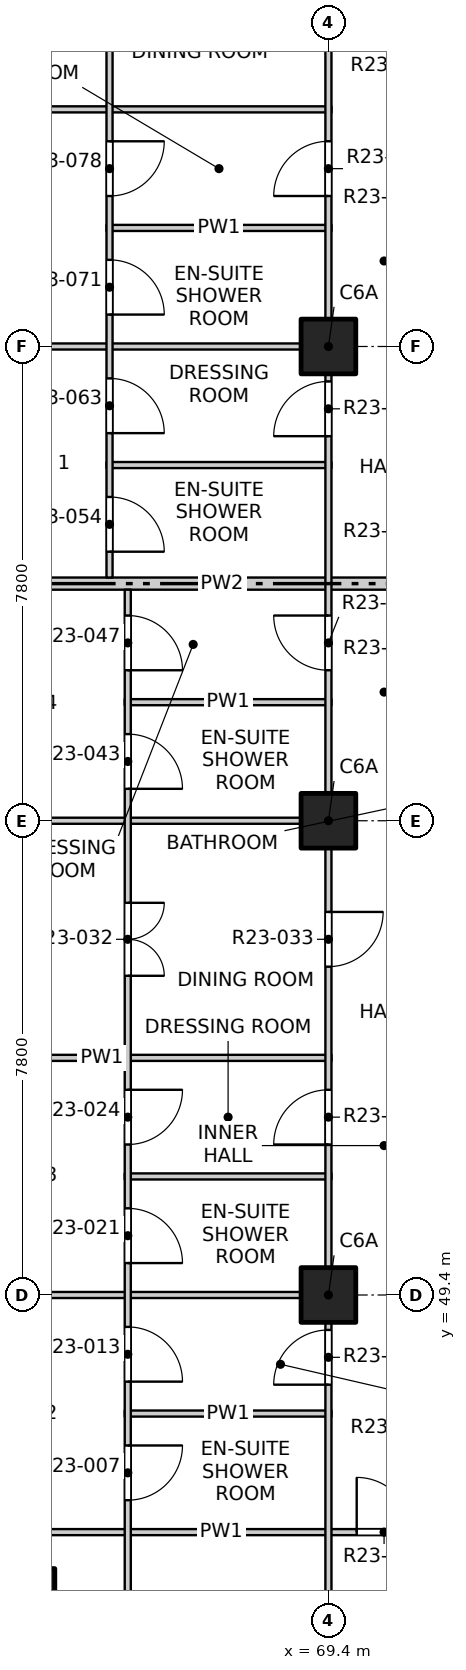
"""IFC4 building model, lengths in metres.
Left out: names, types, materials, properties, quantities, classifications, styles, units other than length and angle.
Written with IfcOpenShell. Run it as: python <this file> out.ifc"""

import sys

from ifc_helpers import new_model, si_unit, direction, frame, frame_2d, origin, origin_2d, place, context, subcontext, project, spatial, rectangle, extrude, element, fill, save


model = new_model("IFC4")
c1 = context("Model", 3, precision=1e-05, world=origin(), true_north=direction((0.0, 1.0)))
c2 = subcontext(c1, "Body", "Model", "MODEL_VIEW")
j1 = project(units=[si_unit("LENGTHUNIT", "METRE"), si_unit("PLANEANGLEUNIT", "RADIAN")], contexts=[c1])
p1 = place(None, origin())
s1 = spatial("IfcSite", under=j1, at=p1, CompositionType="ELEMENT")
p2 = place(p1, origin())
s2 = spatial("IfcBuilding", under=s1, at=p2, CompositionType="ELEMENT")
p3 = place(p2, frame((0.0, 0.0, 238.1)))
s3 = spatial("IfcBuildingStorey", under=s2, at=p3, CompositionType="ELEMENT", Elevation=238.1)
p4 = place(p3, frame((64.5, 44.5, -0.25), z_axis=(0.0, 0.0, 1.0), x_axis=(1.0, 0.0, 0.0)))
e1 = element("IfcColumn", 1, at=p4, inside=s3, PredefinedType="COLUMN", context=c2, shape_type="SweptSolid", body=[
    extrude(rectangle(XDim=0.8, YDim=0.8, at=origin_2d()), origin(), (0.0, 0.0, 1.0), 3.35),
])
for number, where, z_axis, x_axis in (
    (2, (69.4, 49.4, -0.25), (0.0, 0.0, 1.0), (1.0, 0.0, 0.0)),
    (3, (69.4, 57.2, -0.25), (0.0, 0.0, 1.0), (1.0, 0.0, 0.0)),
    (4, (69.4, 65.0, -0.25), (0.0, 0.0, 1.0), (1.0, 0.0, 0.0)),
):
    element("IfcColumn", number, at=place(p3, frame(where, z_axis=z_axis, x_axis=x_axis)), inside=s3, PredefinedType="COLUMN", context=c2, shape_type="SweptSolid", body=[
        extrude(rectangle(XDim=0.9, YDim=0.9, at=origin_2d()), origin(), (0.0, 0.0, 1.0), 3.35),
    ])
p5 = place(p3, frame((61.9, 45.5, 0.0), z_axis=(0.0, 0.0, 1.0), x_axis=(1.0, 0.0, 0.0)))
e5 = element("IfcWall", 5, at=p5, inside=s3, PredefinedType="PARTITIONING", context=c2, shape_type="SweptSolid", body=[
    extrude(rectangle(XDim=11.475, YDim=0.1, at=frame_2d((5.737, 0.0))), origin(), (0.0, 0.0, 1.0), 3.1),
])
p6 = place(p5, frame((7.965, 0.0, 0.0)))
e6 = element("IfcOpeningElement", 6, at=p6, cuts=e5, PredefinedType="OPENING", context=c2, shape_type="SweptSolid", body=[
    extrude(rectangle(XDim=0.9, YDim=2.1, at=frame_2d((0.45, 1.05))), frame((0.0, 0.06, 0.0), z_axis=(0.0, -1.0, 0.0), x_axis=(1.0, 0.0, 0.0)), (0.0, 0.0, 1.0), 0.12),
])
p7 = place(p3, frame((66.05, 47.45, 0.0), z_axis=(0.0, 0.0, 1.0), x_axis=(1.0, 0.0, 0.0)))
e7 = element("IfcWall", 7, at=p7, inside=s3, PredefinedType="PARTITIONING", context=c2, shape_type="SweptSolid", body=[
    extrude(rectangle(XDim=3.4, YDim=0.1, at=frame_2d((1.7, 0.0))), origin(), (0.0, 0.0, 1.0), 3.1),
])
p8 = place(p3, frame((61.9, 49.4, 0.0), z_axis=(0.0, 0.0, 1.0), x_axis=(1.0, 0.0, 0.0)))
e8 = element("IfcWall", 8, at=p8, inside=s3, PredefinedType="PARTITIONING", context=c2, shape_type="SweptSolid", body=[
    extrude(rectangle(XDim=7.55, YDim=0.1, at=frame_2d((3.775, 0.0))), origin(), (0.0, 0.0, 1.0), 3.1),
])
p9 = place(p3, frame((66.05, 51.35, 0.0), z_axis=(0.0, 0.0, 1.0), x_axis=(1.0, 0.0, 0.0)))
e9 = element("IfcWall", 9, at=p9, inside=s3, PredefinedType="PARTITIONING", context=c2, shape_type="SweptSolid", body=[
    extrude(rectangle(XDim=3.4, YDim=0.1, at=frame_2d((1.7, 0.0))), origin(), (0.0, 0.0, 1.0), 3.1),
])
for number, where, z_axis, x_axis in (
    (10, (61.9, 53.3, 0.0), (0.0, 0.0, 1.0), (1.0, 0.0, 0.0)),
    (11, (61.9, 57.2, 0.0), (0.0, 0.0, 1.0), (1.0, 0.0, 0.0)),
):
    element("IfcWall", number, at=place(p3, frame(where, z_axis=z_axis, x_axis=x_axis)), inside=s3, PredefinedType="PARTITIONING", context=c2, shape_type="SweptSolid", body=[
        extrude(rectangle(XDim=7.55, YDim=0.1, at=frame_2d((3.775, 0.0))), origin(), (0.0, 0.0, 1.0), 3.1),
    ])
p10 = place(p3, frame((66.05, 59.15, 0.0), z_axis=(0.0, 0.0, 1.0), x_axis=(1.0, 0.0, 0.0)))
e12 = element("IfcWall", 12, at=p10, inside=s3, PredefinedType="PARTITIONING", context=c2, shape_type="SweptSolid", body=[
    extrude(rectangle(XDim=3.4, YDim=0.1, at=frame_2d((1.7, 0.0))), origin(), (0.0, 0.0, 1.0), 3.1),
])
p11 = place(p3, frame((61.9, 61.1, 0.0), z_axis=(0.0, 0.0, 1.0), x_axis=(1.0, 0.0, 0.0)))
e13 = element("IfcWall", 13, at=p11, inside=s3, PredefinedType="PARTITIONING", context=c2, shape_type="SweptSolid", body=[
    extrude(rectangle(XDim=11.5, YDim=0.2, at=frame_2d((5.75, 0.0))), origin(), (0.0, 0.0, 1.0), 3.1),
])
p12 = place(p3, frame((65.75, 63.05, 0.0), z_axis=(0.0, 0.0, 1.0), x_axis=(1.0, 0.0, 0.0)))
e14 = element("IfcWall", 14, at=p12, inside=s3, PredefinedType="PARTITIONING", context=c2, shape_type="SweptSolid", body=[
    extrude(rectangle(XDim=3.7, YDim=0.1, at=frame_2d((1.85, 0.0))), origin(), (0.0, 0.0, 1.0), 3.1),
])
p13 = place(p3, frame((61.9, 65.0, 0.0), z_axis=(0.0, 0.0, 1.0), x_axis=(1.0, 0.0, 0.0)))
e15 = element("IfcWall", 15, at=p13, inside=s3, PredefinedType="PARTITIONING", context=c2, shape_type="SweptSolid", body=[
    extrude(rectangle(XDim=7.55, YDim=0.1, at=frame_2d((3.775, 0.0))), origin(), (0.0, 0.0, 1.0), 3.1),
])
p14 = place(p3, frame((65.75, 66.95, 0.0), z_axis=(0.0, 0.0, 1.0), x_axis=(1.0, 0.0, 0.0)))
e16 = element("IfcWall", 16, at=p14, inside=s3, PredefinedType="PARTITIONING", context=c2, shape_type="SweptSolid", body=[
    extrude(rectangle(XDim=3.7, YDim=0.1, at=frame_2d((1.85, 0.0))), origin(), (0.0, 0.0, 1.0), 3.1),
])
p15 = place(p3, frame((61.9, 68.9, 0.0), z_axis=(0.0, 0.0, 1.0), x_axis=(1.0, 0.0, 0.0)))
e17 = element("IfcWall", 17, at=p15, inside=s3, PredefinedType="PARTITIONING", context=c2, shape_type="SweptSolid", body=[
    extrude(rectangle(XDim=7.55, YDim=0.1, at=frame_2d((3.775, 0.0))), origin(), (0.0, 0.0, 1.0), 3.1),
])
p16 = place(p3, frame((65.8, 61.2, 0.0), z_axis=(0.0, 0.0, 1.0), x_axis=(0.0, 1.0, 0.0)))
e18 = element("IfcWall", 18, at=p16, inside=s3, PredefinedType="PARTITIONING", context=c2, shape_type="SweptSolid", body=[
    extrude(rectangle(XDim=15.4, YDim=0.1, at=frame_2d((7.7, 0.0))), origin(), (0.0, 0.0, 1.0), 3.1),
])
p17 = place(p16, frame((0.425, 0.0, 0.0)))
e19 = element("IfcOpeningElement", 19, at=p17, cuts=e18, PredefinedType="OPENING", context=c2, shape_type="SweptSolid", body=[
    extrude(rectangle(XDim=0.9, YDim=2.1, at=frame_2d((0.45, 1.05))), frame((0.0, 0.06, 0.0), z_axis=(0.0, -1.0, 0.0), x_axis=(1.0, 0.0, 0.0)), (0.0, 0.0, 1.0), 0.12),
])
p18 = place(p16, frame((2.375, 0.0, 0.0)))
e20 = element("IfcOpeningElement", 20, at=p18, cuts=e18, PredefinedType="OPENING", context=c2, shape_type="SweptSolid", body=[
    extrude(rectangle(XDim=0.9, YDim=2.1, at=frame_2d((0.45, 1.05))), frame((0.0, 0.06, 0.0), z_axis=(0.0, -1.0, 0.0), x_axis=(1.0, 0.0, 0.0)), (0.0, 0.0, 1.0), 0.12),
])
p19 = place(p16, frame((4.325, 0.0, 0.0)))
e21 = element("IfcOpeningElement", 21, at=p19, cuts=e18, PredefinedType="OPENING", context=c2, shape_type="SweptSolid", body=[
    extrude(rectangle(XDim=0.9, YDim=2.1, at=frame_2d((0.45, 1.05))), frame((0.0, 0.06, 0.0), z_axis=(0.0, -1.0, 0.0), x_axis=(1.0, 0.0, 0.0)), (0.0, 0.0, 1.0), 0.12),
])
p20 = place(p16, frame((6.275, 0.0, 0.0)))
e22 = element("IfcOpeningElement", 22, at=p20, cuts=e18, PredefinedType="OPENING", context=c2, shape_type="SweptSolid", body=[
    extrude(rectangle(XDim=0.9, YDim=2.1, at=frame_2d((0.45, 1.05))), frame((0.0, 0.06, 0.0), z_axis=(0.0, -1.0, 0.0), x_axis=(1.0, 0.0, 0.0)), (0.0, 0.0, 1.0), 0.12),
])
p21 = place(p16, frame((9.05, 0.0, 0.0)))
e23 = element("IfcOpeningElement", 23, at=p21, cuts=e18, PredefinedType="OPENING", context=c2, shape_type="SweptSolid", body=[
    extrude(rectangle(XDim=1.2, YDim=2.1, at=frame_2d((0.6, 1.05))), frame((0.0, 0.06, 0.0), z_axis=(0.0, -1.0, 0.0), x_axis=(1.0, 0.0, 0.0)), (0.0, 0.0, 1.0), 0.12),
])
p22 = place(p16, frame((12.95, 0.0, 0.0)))
e24 = element("IfcOpeningElement", 24, at=p22, cuts=e18, PredefinedType="OPENING", context=c2, shape_type="SweptSolid", body=[
    extrude(rectangle(XDim=1.2, YDim=2.1, at=frame_2d((0.6, 1.05))), frame((0.0, 0.06, 0.0), z_axis=(0.0, -1.0, 0.0), x_axis=(1.0, 0.0, 0.0)), (0.0, 0.0, 1.0), 0.12),
])
p23 = place(p3, frame((66.1, 41.9, 0.0), z_axis=(0.0, 0.0, 1.0), x_axis=(0.0, 1.0, 0.0)))
e25 = element("IfcWall", 25, at=p23, inside=s3, PredefinedType="PARTITIONING", context=c2, shape_type="SweptSolid", body=[
    extrude(rectangle(XDim=19.1, YDim=0.1, at=frame_2d((9.55, 0.0))), origin(), (0.0, 0.0, 1.0), 3.1),
])
p24 = place(p23, frame((1.05, 0.0, 0.0)))
e26 = element("IfcOpeningElement", 26, at=p24, cuts=e25, PredefinedType="OPENING", context=c2, shape_type="SweptSolid", body=[
    extrude(rectangle(XDim=1.2, YDim=2.1, at=frame_2d((0.6, 1.05))), frame((0.0, 0.06, 0.0), z_axis=(0.0, -1.0, 0.0), x_axis=(1.0, 0.0, 0.0)), (0.0, 0.0, 1.0), 0.12),
])
p25 = place(p23, frame((4.125, 0.0, 0.0)))
e27 = element("IfcOpeningElement", 27, at=p25, cuts=e25, PredefinedType="OPENING", context=c2, shape_type="SweptSolid", body=[
    extrude(rectangle(XDim=0.9, YDim=2.1, at=frame_2d((0.45, 1.05))), frame((0.0, 0.06, 0.0), z_axis=(0.0, -1.0, 0.0), x_axis=(1.0, 0.0, 0.0)), (0.0, 0.0, 1.0), 0.12),
])
p26 = place(p23, frame((6.075, 0.0, 0.0)))
e28 = element("IfcOpeningElement", 28, at=p26, cuts=e25, PredefinedType="OPENING", context=c2, shape_type="SweptSolid", body=[
    extrude(rectangle(XDim=0.9, YDim=2.1, at=frame_2d((0.45, 1.05))), frame((0.0, 0.06, 0.0), z_axis=(0.0, -1.0, 0.0), x_axis=(1.0, 0.0, 0.0)), (0.0, 0.0, 1.0), 0.12),
])
p27 = place(p23, frame((8.025, 0.0, 0.0)))
e29 = element("IfcOpeningElement", 29, at=p27, cuts=e25, PredefinedType="OPENING", context=c2, shape_type="SweptSolid", body=[
    extrude(rectangle(XDim=0.9, YDim=2.1, at=frame_2d((0.45, 1.05))), frame((0.0, 0.06, 0.0), z_axis=(0.0, -1.0, 0.0), x_axis=(1.0, 0.0, 0.0)), (0.0, 0.0, 1.0), 0.12),
])
p28 = place(p23, frame((9.975, 0.0, 0.0)))
e30 = element("IfcOpeningElement", 30, at=p28, cuts=e25, PredefinedType="OPENING", context=c2, shape_type="SweptSolid", body=[
    extrude(rectangle(XDim=0.9, YDim=2.1, at=frame_2d((0.45, 1.05))), frame((0.0, 0.06, 0.0), z_axis=(0.0, -1.0, 0.0), x_axis=(1.0, 0.0, 0.0)), (0.0, 0.0, 1.0), 0.12),
])
p29 = place(p23, frame((12.75, 0.0, 0.0)))
e31 = element("IfcOpeningElement", 31, at=p29, cuts=e25, PredefinedType="OPENING", context=c2, shape_type="SweptSolid", body=[
    extrude(rectangle(XDim=1.2, YDim=2.1, at=frame_2d((0.6, 1.05))), frame((0.0, 0.06, 0.0), z_axis=(0.0, -1.0, 0.0), x_axis=(1.0, 0.0, 0.0)), (0.0, 0.0, 1.0), 0.12),
])
p30 = place(p23, frame((15.825, 0.0, 0.0)))
e32 = element("IfcOpeningElement", 32, at=p30, cuts=e25, PredefinedType="OPENING", context=c2, shape_type="SweptSolid", body=[
    extrude(rectangle(XDim=0.9, YDim=2.1, at=frame_2d((0.45, 1.05))), frame((0.0, 0.06, 0.0), z_axis=(0.0, -1.0, 0.0), x_axis=(1.0, 0.0, 0.0)), (0.0, 0.0, 1.0), 0.12),
])
p31 = place(p23, frame((17.775, 0.0, 0.0)))
e33 = element("IfcOpeningElement", 33, at=p31, cuts=e25, PredefinedType="OPENING", context=c2, shape_type="SweptSolid", body=[
    extrude(rectangle(XDim=0.9, YDim=2.1, at=frame_2d((0.45, 1.05))), frame((0.0, 0.06, 0.0), z_axis=(0.0, -1.0, 0.0), x_axis=(1.0, 0.0, 0.0)), (0.0, 0.0, 1.0), 0.12),
])
p32 = place(p3, frame((69.4, 41.9, 0.0), z_axis=(0.0, 0.0, 1.0), x_axis=(0.0, 1.0, 0.0)))
e34 = element("IfcWall", 34, at=p32, inside=s3, PredefinedType="PARTITIONING", context=c2, shape_type="SweptSolid", body=[
    extrude(rectangle(XDim=46.2, YDim=0.1, at=frame_2d((23.1, 0.0))), origin(), (0.0, 0.0, 1.0), 3.1),
])
p33 = place(p32, frame((1.2, 0.0, 0.0)))
e35 = element("IfcOpeningElement", 35, at=p33, cuts=e34, PredefinedType="OPENING", context=c2, shape_type="SweptSolid", body=[
    extrude(rectangle(XDim=0.9, YDim=2.1, at=frame_2d((0.45, 1.05))), frame((0.0, 0.06, 0.0), z_axis=(0.0, -1.0, 0.0), x_axis=(1.0, 0.0, 0.0)), (0.0, 0.0, 1.0), 0.12),
])
p34 = place(p32, frame((6.025, 0.0, 0.0)))
e36 = element("IfcOpeningElement", 36, at=p34, cuts=e34, PredefinedType="OPENING", context=c2, shape_type="SweptSolid", body=[
    extrude(rectangle(XDim=0.9, YDim=2.1, at=frame_2d((0.45, 1.05))), frame((0.0, 0.06, 0.0), z_axis=(0.0, -1.0, 0.0), x_axis=(1.0, 0.0, 0.0)), (0.0, 0.0, 1.0), 0.12),
])
p35 = place(p32, frame((9.975, 0.0, 0.0)))
e37 = element("IfcOpeningElement", 37, at=p35, cuts=e34, PredefinedType="OPENING", context=c2, shape_type="SweptSolid", body=[
    extrude(rectangle(XDim=0.9, YDim=2.1, at=frame_2d((0.45, 1.05))), frame((0.0, 0.06, 0.0), z_axis=(0.0, -1.0, 0.0), x_axis=(1.0, 0.0, 0.0)), (0.0, 0.0, 1.0), 0.12),
])
p36 = place(p32, frame((12.9, 0.0, 0.0)))
e38 = element("IfcOpeningElement", 38, at=p36, cuts=e34, PredefinedType="OPENING", context=c2, shape_type="SweptSolid", body=[
    extrude(rectangle(XDim=0.9, YDim=2.1, at=frame_2d((0.45, 1.05))), frame((0.0, 0.06, 0.0), z_axis=(0.0, -1.0, 0.0), x_axis=(1.0, 0.0, 0.0)), (0.0, 0.0, 1.0), 0.12),
])
p37 = place(p32, frame((17.775, 0.0, 0.0)))
e39 = element("IfcOpeningElement", 39, at=p37, cuts=e34, PredefinedType="OPENING", context=c2, shape_type="SweptSolid", body=[
    extrude(rectangle(XDim=0.9, YDim=2.1, at=frame_2d((0.45, 1.05))), frame((0.0, 0.06, 0.0), z_axis=(0.0, -1.0, 0.0), x_axis=(1.0, 0.0, 0.0)), (0.0, 0.0, 1.0), 0.12),
])
p38 = place(p32, frame((21.625, 0.0, 0.0)))
e40 = element("IfcOpeningElement", 40, at=p38, cuts=e34, PredefinedType="OPENING", context=c2, shape_type="SweptSolid", body=[
    extrude(rectangle(XDim=0.9, YDim=2.1, at=frame_2d((0.45, 1.05))), frame((0.0, 0.06, 0.0), z_axis=(0.0, -1.0, 0.0), x_axis=(1.0, 0.0, 0.0)), (0.0, 0.0, 1.0), 0.12),
])
p39 = place(p32, frame((25.575, 0.0, 0.0)))
e41 = element("IfcOpeningElement", 41, at=p39, cuts=e34, PredefinedType="OPENING", context=c2, shape_type="SweptSolid", body=[
    extrude(rectangle(XDim=0.9, YDim=2.1, at=frame_2d((0.45, 1.05))), frame((0.0, 0.06, 0.0), z_axis=(0.0, -1.0, 0.0), x_axis=(1.0, 0.0, 0.0)), (0.0, 0.0, 1.0), 0.12),
])
p40 = place(p32, frame((28.5, 0.0, 0.0)))
e42 = element("IfcOpeningElement", 42, at=p40, cuts=e34, PredefinedType="OPENING", context=c2, shape_type="SweptSolid", body=[
    extrude(rectangle(XDim=0.9, YDim=2.1, at=frame_2d((0.45, 1.05))), frame((0.0, 0.06, 0.0), z_axis=(0.0, -1.0, 0.0), x_axis=(1.0, 0.0, 0.0)), (0.0, 0.0, 1.0), 0.12),
])
p41 = place(p32, frame((32.4, 0.0, 0.0)))
e43 = element("IfcOpeningElement", 43, at=p41, cuts=e34, PredefinedType="OPENING", context=c2, shape_type="SweptSolid", body=[
    extrude(rectangle(XDim=0.9, YDim=2.1, at=frame_2d((0.45, 1.05))), frame((0.0, 0.06, 0.0), z_axis=(0.0, -1.0, 0.0), x_axis=(1.0, 0.0, 0.0)), (0.0, 0.0, 1.0), 0.12),
])
p42 = place(p32, frame((36.3, 0.0, 0.0)))
e44 = element("IfcOpeningElement", 44, at=p42, cuts=e34, PredefinedType="OPENING", context=c2, shape_type="SweptSolid", body=[
    extrude(rectangle(XDim=0.9, YDim=2.1, at=frame_2d((0.45, 1.05))), frame((0.0, 0.06, 0.0), z_axis=(0.0, -1.0, 0.0), x_axis=(1.0, 0.0, 0.0)), (0.0, 0.0, 1.0), 0.12),
])
p43 = place(p32, frame((40.2, 0.0, 0.0)))
e45 = element("IfcOpeningElement", 45, at=p43, cuts=e34, PredefinedType="OPENING", context=c2, shape_type="SweptSolid", body=[
    extrude(rectangle(XDim=0.9, YDim=2.1, at=frame_2d((0.45, 1.05))), frame((0.0, 0.06, 0.0), z_axis=(0.0, -1.0, 0.0), x_axis=(1.0, 0.0, 0.0)), (0.0, 0.0, 1.0), 0.12),
])
p44 = place(p32, frame((44.1, 0.0, 0.0)))
e46 = element("IfcOpeningElement", 46, at=p44, cuts=e34, PredefinedType="OPENING", context=c2, shape_type="SweptSolid", body=[
    extrude(rectangle(XDim=0.9, YDim=2.1, at=frame_2d((0.45, 1.05))), frame((0.0, 0.06, 0.0), z_axis=(0.0, -1.0, 0.0), x_axis=(1.0, 0.0, 0.0)), (0.0, 0.0, 1.0), 0.12),
])
p45 = place(p6, origin())
e47 = element("IfcDoor", 47, at=p45, inside=s3, OperationType="SINGLE_SWING_LEFT", PredefinedType="DOOR", context=c2, shape_type="SweptSolid", body=[
    extrude(rectangle(XDim=0.9, YDim=2.1, at=frame_2d((0.45, 1.05))), frame((0.0, 0.025, 0.0), z_axis=(0.0, -1.0, 0.0), x_axis=(1.0, 0.0, 0.0)), (0.0, 0.0, 1.0), 0.05),
])
fill(e6, e47)
p46 = place(p25, origin())
e48 = element("IfcDoor", 48, at=p46, inside=s3, OperationType="SINGLE_SWING_LEFT", PredefinedType="DOOR", context=c2, shape_type="SweptSolid", body=[
    extrude(rectangle(XDim=0.9, YDim=2.1, at=frame_2d((0.45, 1.05))), frame((0.0, 0.025, 0.0), z_axis=(0.0, -1.0, 0.0), x_axis=(1.0, 0.0, 0.0)), (0.0, 0.0, 1.0), 0.05),
])
fill(e27, e48)
p47 = place(p34, origin())
e49 = element("IfcDoor", 49, at=p47, inside=s3, OperationType="SINGLE_SWING_LEFT", PredefinedType="DOOR", context=c2, shape_type="SweptSolid", body=[
    extrude(rectangle(XDim=0.9, YDim=2.1, at=frame_2d((0.45, 1.05))), frame((0.0, 0.025, 0.0), z_axis=(0.0, -1.0, 0.0), x_axis=(1.0, 0.0, 0.0)), (0.0, 0.0, 1.0), 0.05),
])
fill(e36, e49)
p48 = place(p26, origin())
e50 = element("IfcDoor", 50, at=p48, inside=s3, OperationType="SINGLE_SWING_RIGHT", PredefinedType="DOOR", context=c2, shape_type="SweptSolid", body=[
    extrude(rectangle(XDim=0.9, YDim=2.1, at=frame_2d((0.45, 1.05))), frame((0.0, 0.025, 0.0), z_axis=(0.0, -1.0, 0.0), x_axis=(1.0, 0.0, 0.0)), (0.0, 0.0, 1.0), 0.05),
])
fill(e28, e50)
p49 = place(p27, origin())
e51 = element("IfcDoor", 51, at=p49, inside=s3, OperationType="SINGLE_SWING_RIGHT", PredefinedType="DOOR", context=c2, shape_type="SweptSolid", body=[
    extrude(rectangle(XDim=0.9, YDim=2.1, at=frame_2d((0.45, 1.05))), frame((0.0, 0.025, 0.0), z_axis=(0.0, -1.0, 0.0), x_axis=(1.0, 0.0, 0.0)), (0.0, 0.0, 1.0), 0.05),
])
fill(e29, e51)
p50 = place(p28, origin())
e52 = element("IfcDoor", 52, at=p50, inside=s3, OperationType="SINGLE_SWING_LEFT", PredefinedType="DOOR", context=c2, shape_type="SweptSolid", body=[
    extrude(rectangle(XDim=0.9, YDim=2.1, at=frame_2d((0.45, 1.05))), frame((0.0, 0.025, 0.0), z_axis=(0.0, -1.0, 0.0), x_axis=(1.0, 0.0, 0.0)), (0.0, 0.0, 1.0), 0.05),
])
fill(e30, e52)
p51 = place(p35, origin())
e53 = element("IfcDoor", 53, at=p51, inside=s3, OperationType="SINGLE_SWING_LEFT", PredefinedType="DOOR", context=c2, shape_type="SweptSolid", body=[
    extrude(rectangle(XDim=0.9, YDim=2.1, at=frame_2d((0.45, 1.05))), frame((0.0, 0.025, 0.0), z_axis=(0.0, -1.0, 0.0), x_axis=(1.0, 0.0, 0.0)), (0.0, 0.0, 1.0), 0.05),
])
fill(e37, e53)
p52 = place(p29, origin())
e54 = element("IfcDoor", 54, at=p52, inside=s3, OperationType="DOUBLE_DOOR_SINGLE_SWING", PredefinedType="DOOR", context=c2, shape_type="SweptSolid", body=[
    extrude(rectangle(XDim=1.2, YDim=2.1, at=frame_2d((0.6, 1.05))), frame((0.0, 0.025, 0.0), z_axis=(0.0, -1.0, 0.0), x_axis=(1.0, 0.0, 0.0)), (0.0, 0.0, 1.0), 0.05),
])
fill(e31, e54)
p53 = place(p36, origin())
e55 = element("IfcDoor", 55, at=p53, inside=s3, OperationType="SINGLE_SWING_LEFT", PredefinedType="DOOR", context=c2, shape_type="SweptSolid", body=[
    extrude(rectangle(XDim=0.9, YDim=2.1, at=frame_2d((0.45, 1.05))), frame((0.0, 0.025, 0.0), z_axis=(0.0, -1.0, 0.0), x_axis=(1.0, 0.0, 0.0)), (0.0, 0.0, 1.0), 0.05),
])
fill(e38, e55)
p54 = place(p30, origin())
e56 = element("IfcDoor", 56, at=p54, inside=s3, OperationType="SINGLE_SWING_RIGHT", PredefinedType="DOOR", context=c2, shape_type="SweptSolid", body=[
    extrude(rectangle(XDim=0.9, YDim=2.1, at=frame_2d((0.45, 1.05))), frame((0.0, 0.025, 0.0), z_axis=(0.0, -1.0, 0.0), x_axis=(1.0, 0.0, 0.0)), (0.0, 0.0, 1.0), 0.05),
])
fill(e32, e56)
p55 = place(p31, origin())
e57 = element("IfcDoor", 57, at=p55, inside=s3, OperationType="SINGLE_SWING_RIGHT", PredefinedType="DOOR", context=c2, shape_type="SweptSolid", body=[
    extrude(rectangle(XDim=0.9, YDim=2.1, at=frame_2d((0.45, 1.05))), frame((0.0, 0.025, 0.0), z_axis=(0.0, -1.0, 0.0), x_axis=(1.0, 0.0, 0.0)), (0.0, 0.0, 1.0), 0.05),
])
fill(e33, e57)
p56 = place(p37, origin())
e58 = element("IfcDoor", 58, at=p56, inside=s3, OperationType="SINGLE_SWING_RIGHT", PredefinedType="DOOR", context=c2, shape_type="SweptSolid", body=[
    extrude(rectangle(XDim=0.9, YDim=2.1, at=frame_2d((0.45, 1.05))), frame((0.0, 0.025, 0.0), z_axis=(0.0, -1.0, 0.0), x_axis=(1.0, 0.0, 0.0)), (0.0, 0.0, 1.0), 0.05),
])
fill(e39, e58)
p57 = place(p17, origin())
e59 = element("IfcDoor", 59, at=p57, inside=s3, OperationType="SINGLE_SWING_RIGHT", PredefinedType="DOOR", context=c2, shape_type="SweptSolid", body=[
    extrude(rectangle(XDim=0.9, YDim=2.1, at=frame_2d((0.45, 1.05))), frame((0.0, 0.025, 0.0), z_axis=(0.0, -1.0, 0.0), x_axis=(1.0, 0.0, 0.0)), (0.0, 0.0, 1.0), 0.05),
])
fill(e19, e59)
p58 = place(p38, origin())
e60 = element("IfcDoor", 60, at=p58, inside=s3, OperationType="SINGLE_SWING_LEFT", PredefinedType="DOOR", context=c2, shape_type="SweptSolid", body=[
    extrude(rectangle(XDim=0.9, YDim=2.1, at=frame_2d((0.45, 1.05))), frame((0.0, 0.025, 0.0), z_axis=(0.0, -1.0, 0.0), x_axis=(1.0, 0.0, 0.0)), (0.0, 0.0, 1.0), 0.05),
])
fill(e40, e60)
p59 = place(p18, origin())
e61 = element("IfcDoor", 61, at=p59, inside=s3, OperationType="SINGLE_SWING_RIGHT", PredefinedType="DOOR", context=c2, shape_type="SweptSolid", body=[
    extrude(rectangle(XDim=0.9, YDim=2.1, at=frame_2d((0.45, 1.05))), frame((0.0, 0.025, 0.0), z_axis=(0.0, -1.0, 0.0), x_axis=(1.0, 0.0, 0.0)), (0.0, 0.0, 1.0), 0.05),
])
fill(e20, e61)
p60 = place(p19, origin())
e62 = element("IfcDoor", 62, at=p60, inside=s3, OperationType="SINGLE_SWING_RIGHT", PredefinedType="DOOR", context=c2, shape_type="SweptSolid", body=[
    extrude(rectangle(XDim=0.9, YDim=2.1, at=frame_2d((0.45, 1.05))), frame((0.0, 0.025, 0.0), z_axis=(0.0, -1.0, 0.0), x_axis=(1.0, 0.0, 0.0)), (0.0, 0.0, 1.0), 0.05),
])
fill(e21, e62)
p61 = place(p20, origin())
e63 = element("IfcDoor", 63, at=p61, inside=s3, OperationType="SINGLE_SWING_LEFT", PredefinedType="DOOR", context=c2, shape_type="SweptSolid", body=[
    extrude(rectangle(XDim=0.9, YDim=2.1, at=frame_2d((0.45, 1.05))), frame((0.0, 0.025, 0.0), z_axis=(0.0, -1.0, 0.0), x_axis=(1.0, 0.0, 0.0)), (0.0, 0.0, 1.0), 0.05),
])
fill(e22, e63)
p62 = place(p39, origin())
e64 = element("IfcDoor", 64, at=p62, inside=s3, OperationType="SINGLE_SWING_LEFT", PredefinedType="DOOR", context=c2, shape_type="SweptSolid", body=[
    extrude(rectangle(XDim=0.9, YDim=2.1, at=frame_2d((0.45, 1.05))), frame((0.0, 0.025, 0.0), z_axis=(0.0, -1.0, 0.0), x_axis=(1.0, 0.0, 0.0)), (0.0, 0.0, 1.0), 0.05),
])
fill(e41, e64)
save(model, sys.argv[1])
